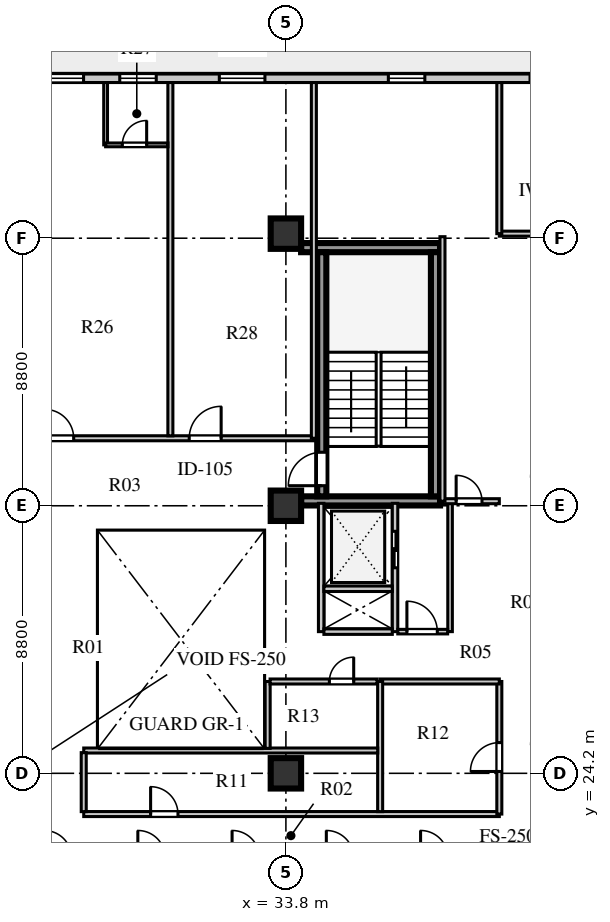
"""IFC4 building model, lengths in metres.
Left out: names, types, materials, properties, quantities, classifications, styles, units other than length and angle.
Written with IfcOpenShell. Run it as: python <this file> out.ifc"""

import sys

from ifc_helpers import new_model, si_unit, direction, frame, frame_2d, origin, origin_2d, place, context, subcontext, project, spatial, rectangle, extrude, element, fill, save


model = new_model("IFC4")
c1 = context("Model", 3, precision=1e-05, world=origin(), true_north=direction((0.0, 1.0)))
c2 = subcontext(c1, "Body", "Model", "MODEL_VIEW")
j1 = project(units=[si_unit("LENGTHUNIT", "METRE"), si_unit("PLANEANGLEUNIT", "RADIAN")], contexts=[c1])
p1 = place(None, origin())
s1 = spatial("IfcSite", under=j1, at=p1, CompositionType="ELEMENT")
p2 = place(p1, origin())
s2 = spatial("IfcBuilding", under=s1, at=p2, CompositionType="ELEMENT")
p3 = place(p2, frame((0.0, 0.0, 142.5)))
s3 = spatial("IfcBuildingStorey", under=s2, at=p3, CompositionType="ELEMENT", Elevation=142.5)
for number, where, z_axis, x_axis in (
    (1, (34.3, 33.16, 0.0), (0.0, 0.0, 1.0), (1.0, 0.0, 0.0)),
    (2, (34.3, 41.49, 0.0), (0.0, 0.0, 1.0), (1.0, 0.0, 0.0)),
):
    element("IfcWall", number, at=place(p3, frame(where, z_axis=z_axis, x_axis=x_axis)), inside=s3, PredefinedType="SHEAR", context=c2, shape_type="SweptSolid", body=[
        extrude(rectangle(XDim=4.57, YDim=0.3, at=frame_2d((2.285, 0.0))), origin(), (0.0, 0.0, 1.0), 3.6),
    ])
p4 = place(p3, frame((34.98, 33.31, 0.0), z_axis=(0.0, 0.0, 1.0), x_axis=(0.0, 1.0, 0.0)))
e3 = element("IfcWall", 3, at=p4, inside=s3, PredefinedType="SHEAR", context=c2, shape_type="SweptSolid", body=[
    extrude(rectangle(XDim=8.03, YDim=0.3, at=frame_2d((4.015, 0.0))), origin(), (0.0, 0.0, 1.0), 3.6),
])
p5 = place(p4, frame((0.35, 0.0, 0.0)))
e4 = element("IfcOpeningElement", 4, at=p5, cuts=e3, PredefinedType="OPENING", context=c2, shape_type="SweptSolid", body=[
    extrude(rectangle(XDim=1.1, YDim=2.1, at=frame_2d((0.55, 1.05))), frame((0.0, 0.16, 0.0), z_axis=(0.0, -1.0, 0.0), x_axis=(1.0, 0.0, 0.0)), (0.0, 0.0, 1.0), 0.32),
])
p6 = place(p3, frame((38.72, 33.31, 0.0), z_axis=(0.0, 0.0, 1.0), x_axis=(0.0, 1.0, 0.0)))
e5 = element("IfcWall", 5, at=p6, inside=s3, PredefinedType="SHEAR", context=c2, shape_type="SweptSolid", body=[
    extrude(rectangle(XDim=8.03, YDim=0.3, at=frame_2d((4.015, 0.0))), origin(), (0.0, 0.0, 1.0), 3.6),
])
for number, where, z_axis, x_axis in (
    (6, (33.8, 24.2, 0.0), (0.0, 0.0, 1.0), (1.0, 0.0, 0.0)),
    (7, (33.8, 33.0, 0.0), (0.0, 0.0, 1.0), (1.0, 0.0, 0.0)),
    (8, (33.8, 41.95, 0.0), (0.0, 0.0, 1.0), (1.0, 0.0, 0.0)),
):
    element("IfcColumn", number, at=place(p3, frame(where, z_axis=z_axis, x_axis=x_axis)), inside=s3, PredefinedType="COLUMN", context=c2, shape_type="SweptSolid", body=[
        extrude(rectangle(XDim=1.0, YDim=1.0, at=origin_2d()), origin(), (0.0, 0.0, 1.0), 3.6),
    ])
p7 = place(p3, frame((45.35, 47.06, 0.0), z_axis=(0.0, 0.0, 1.0), x_axis=(-1.0, 0.0, 0.0)))
e9 = element("IfcWall", 9, at=p7, inside=s3, PredefinedType="STANDARD", context=c2, shape_type="SweptSolid", body=[
    extrude(rectangle(XDim=32.1, YDim=0.28, at=frame_2d((16.05, 0.0))), origin(), (0.0, 0.0, 1.0), 3.6),
])
p8 = place(p7, frame((30.15, 0.0, 0.0)))
e10 = element("IfcOpeningElement", 10, at=p8, cuts=e9, PredefinedType="OPENING", context=c2, shape_type="SweptSolid", body=[
    extrude(rectangle(XDim=1.0, YDim=2.05, at=frame_2d((0.5, 1.025))), frame((0.0, 0.15, 0.0), z_axis=(0.0, -1.0, 0.0), x_axis=(1.0, 0.0, 0.0)), (0.0, 0.0, 1.0), 0.3),
])
p9 = place(p7, frame((24.195, 0.0, 0.8)))
e11 = element("IfcOpeningElement", 11, at=p9, cuts=e9, PredefinedType="OPENING", context=c2, shape_type="SweptSolid", body=[
    extrude(rectangle(XDim=1.95, YDim=2.0, at=frame_2d((0.975, 1.0))), frame((0.0, 0.15, 0.0), z_axis=(0.0, -1.0, 0.0), x_axis=(1.0, 0.0, 0.0)), (0.0, 0.0, 1.0), 0.3),
])
p10 = place(p7, frame((18.205, 0.0, 0.8)))
e12 = element("IfcOpeningElement", 12, at=p10, cuts=e9, PredefinedType="OPENING", context=c2, shape_type="SweptSolid", body=[
    extrude(rectangle(XDim=1.2, YDim=1.75, at=frame_2d((0.6, 0.875))), frame((0.0, 0.15, 0.0), z_axis=(0.0, -1.0, 0.0), x_axis=(1.0, 0.0, 0.0)), (0.0, 0.0, 1.0), 0.3),
])
p11 = place(p7, frame((15.815, 0.0, 0.8)))
e13 = element("IfcOpeningElement", 13, at=p11, cuts=e9, PredefinedType="OPENING", context=c2, shape_type="SweptSolid", body=[
    extrude(rectangle(XDim=1.2, YDim=1.75, at=frame_2d((0.6, 0.875))), frame((0.0, 0.15, 0.0), z_axis=(0.0, -1.0, 0.0), x_axis=(1.0, 0.0, 0.0)), (0.0, 0.0, 1.0), 0.3),
])
p12 = place(p7, frame((12.24, 0.0, 0.8)))
e14 = element("IfcOpeningElement", 14, at=p12, cuts=e9, PredefinedType="OPENING", context=c2, shape_type="SweptSolid", body=[
    extrude(rectangle(XDim=1.5, YDim=2.0, at=frame_2d((0.75, 1.0))), frame((0.0, 0.15, 0.0), z_axis=(0.0, -1.0, 0.0), x_axis=(1.0, 0.0, 0.0)), (0.0, 0.0, 1.0), 0.3),
])
p13 = place(p7, frame((6.98, 0.0, 0.8)))
e15 = element("IfcOpeningElement", 15, at=p13, cuts=e9, PredefinedType="OPENING", context=c2, shape_type="SweptSolid", body=[
    extrude(rectangle(XDim=1.2, YDim=1.75, at=frame_2d((0.6, 0.875))), frame((0.0, 0.15, 0.0), z_axis=(0.0, -1.0, 0.0), x_axis=(1.0, 0.0, 0.0)), (0.0, 0.0, 1.0), 0.3),
])
p14 = place(p7, frame((1.12, 0.0, 0.8)))
e16 = element("IfcOpeningElement", 16, at=p14, cuts=e9, PredefinedType="OPENING", context=c2, shape_type="SweptSolid", body=[
    extrude(rectangle(XDim=2.4, YDim=2.05, at=frame_2d((1.2, 1.025))), frame((0.0, 0.15, 0.0), z_axis=(0.0, -1.0, 0.0), x_axis=(1.0, 0.0, 0.0)), (0.0, 0.0, 1.0), 0.3),
])
p15 = place(p3, frame((34.96, 28.86, 0.0), z_axis=(0.0, 0.0, 1.0), x_axis=(0.0, 1.0, 0.0)))
e17 = element("IfcWall", 17, at=p15, inside=s3, PredefinedType="SOLIDWALL", context=c2, shape_type="SweptSolid", body=[
    extrude(rectangle(XDim=4.22, YDim=0.18, at=frame_2d((2.11, 0.0))), origin(), (0.0, 0.0, 1.0), 3.6),
])
p16 = place(p3, frame((37.39, 28.86, 0.0), z_axis=(0.0, 0.0, 1.0), x_axis=(0.0, 1.0, 0.0)))
e18 = element("IfcWall", 18, at=p16, inside=s3, PredefinedType="SOLIDWALL", context=c2, shape_type="SweptSolid", body=[
    extrude(rectangle(XDim=4.22, YDim=0.18, at=frame_2d((2.11, 0.0))), origin(), (0.0, 0.0, 1.0), 3.6),
])
p17 = place(p16, frame((2.1, 0.0, 0.0)))
e19 = element("IfcOpeningElement", 19, at=p17, cuts=e18, PredefinedType="OPENING", context=c2, shape_type="SweptSolid", body=[
    extrude(rectangle(XDim=1.2, YDim=2.12, at=frame_2d((0.6, 1.06))), frame((0.0, 0.1, 0.0), z_axis=(0.0, -1.0, 0.0), x_axis=(1.0, 0.0, 0.0)), (0.0, 0.0, 1.0), 0.2),
])
for number, where, z_axis, x_axis in (
    (20, (35.05, 28.86, 0.0), (0.0, 0.0, 1.0), (1.0, 0.0, 0.0)),
    (21, (35.05, 30.27, 0.0), (0.0, 0.0, 1.0), (1.0, 0.0, 0.0)),
):
    element("IfcWall", number, at=place(p3, frame(where, z_axis=z_axis, x_axis=x_axis)), inside=s3, PredefinedType="SOLIDWALL", context=c2, shape_type="SweptSolid", body=[
        extrude(rectangle(XDim=2.25, YDim=0.18, at=frame_2d((1.125, 0.0))), origin(), (0.0, 0.0, 1.0), 3.6),
    ])
p18 = place(p3, frame((39.2, 28.86, 0.0), z_axis=(0.0, 0.0, 1.0), x_axis=(0.0, 1.0, 0.0)))
e22 = element("IfcWall", 22, at=p18, inside=s3, PredefinedType="PARTITIONING", context=c2, shape_type="SweptSolid", body=[
    extrude(rectangle(XDim=4.22, YDim=0.15, at=frame_2d((2.11, 0.0))), origin(), (0.0, 0.0, 1.0), 3.6),
])
p19 = place(p3, frame((37.48, 28.86, 0.0), z_axis=(0.0, 0.0, 1.0), x_axis=(1.0, 0.0, 0.0)))
e23 = element("IfcWall", 23, at=p19, inside=s3, PredefinedType="PARTITIONING", context=c2, shape_type="SweptSolid", body=[
    extrude(rectangle(XDim=1.64, YDim=0.15, at=frame_2d((0.82, 0.0))), origin(), (0.0, 0.0, 1.0), 3.6),
])
p20 = place(p19, frame((0.3, 0.0, 0.0)))
e24 = element("IfcOpeningElement", 24, at=p20, cuts=e23, PredefinedType="OPENING", context=c2, shape_type="SweptSolid", body=[
    extrude(rectangle(XDim=1.0, YDim=2.1, at=frame_2d((0.5, 1.05))), frame((0.0, 0.085, 0.0), z_axis=(0.0, -1.0, 0.0), x_axis=(1.0, 0.0, 0.0)), (0.0, 0.0, 1.0), 0.17),
])
p21 = place(p3, frame((27.15, 22.86, 0.0), z_axis=(0.0, 0.0, 1.0), x_axis=(1.0, 0.0, 0.0)))
e25 = element("IfcWall", 25, at=p21, inside=s3, PredefinedType="PARTITIONING", context=c2, shape_type="SweptSolid", body=[
    extrude(rectangle(XDim=13.67, YDim=0.165, at=frame_2d((6.835, 0.0))), origin(), (0.0, 0.0, 1.0), 3.6),
])
p22 = place(p21, frame((2.2, 0.0, 0.0)))
e26 = element("IfcOpeningElement", 26, at=p22, cuts=e25, PredefinedType="OPENING", context=c2, shape_type="SweptSolid", body=[
    extrude(rectangle(XDim=0.9, YDim=2.08, at=frame_2d((0.45, 1.04))), frame((0.0, 0.093, 0.0), z_axis=(0.0, -1.0, 0.0), x_axis=(1.0, 0.0, 0.0)), (0.0, 0.0, 1.0), 0.185),
])
p23 = place(p3, frame((25.22, 35.22, 0.0), z_axis=(0.0, 0.0, 1.0), x_axis=(1.0, 0.0, 0.0)))
e27 = element("IfcWall", 27, at=p23, inside=s3, PredefinedType="PARTITIONING", context=c2, shape_type="SweptSolid", body=[
    extrude(rectangle(XDim=9.5, YDim=0.165, at=frame_2d((4.75, 0.0))), origin(), (0.0, 0.0, 1.0), 3.6),
])
p24 = place(p23, frame((0.65, 0.0, 0.0)))
e28 = element("IfcOpeningElement", 28, at=p24, cuts=e27, PredefinedType="OPENING", context=c2, shape_type="SweptSolid", body=[
    extrude(rectangle(XDim=0.95, YDim=2.1, at=frame_2d((0.475, 1.05))), frame((0.0, 0.093, 0.0), z_axis=(0.0, -1.0, 0.0), x_axis=(1.0, 0.0, 0.0)), (0.0, 0.0, 1.0), 0.185),
])
p25 = place(p23, frame((5.4, 0.0, 0.0)))
e29 = element("IfcOpeningElement", 29, at=p25, cuts=e27, PredefinedType="OPENING", context=c2, shape_type="SweptSolid", body=[
    extrude(rectangle(XDim=1.05, YDim=2.1, at=frame_2d((0.525, 1.05))), frame((0.0, 0.093, 0.0), z_axis=(0.0, -1.0, 0.0), x_axis=(1.0, 0.0, 0.0)), (0.0, 0.0, 1.0), 0.185),
])
p26 = place(p3, frame((40.82, 41.95, 0.0), z_axis=(0.0, 0.0, 1.0), x_axis=(1.0, 0.0, 0.0)))
e30 = element("IfcWall", 30, at=p26, inside=s3, PredefinedType="PARTITIONING", context=c2, shape_type="SweptSolid", body=[
    extrude(rectangle(XDim=7.3, YDim=0.165, at=frame_2d((3.65, 0.0))), origin(), (0.0, 0.0, 1.0), 2.95),
])
p27 = place(p3, frame((40.82, 22.86, 0.0), z_axis=(0.0, 0.0, 1.0), x_axis=(0.0, 1.0, 0.0)))
e31 = element("IfcWall", 31, at=p27, inside=s3, PredefinedType="PARTITIONING", context=c2, shape_type="SweptSolid", body=[
    extrude(rectangle(XDim=4.36, YDim=0.165, at=frame_2d((2.18, 0.0))), origin(), (0.0, 0.0, 1.0), 3.6),
])
p28 = place(p27, frame((1.4, 0.0, 0.0)))
e32 = element("IfcOpeningElement", 32, at=p28, cuts=e31, PredefinedType="OPENING", context=c2, shape_type="SweptSolid", body=[
    extrude(rectangle(XDim=0.95, YDim=2.1, at=frame_2d((0.475, 1.05))), frame((0.0, 0.093, 0.0), z_axis=(0.0, -1.0, 0.0), x_axis=(1.0, 0.0, 0.0)), (0.0, 0.0, 1.0), 0.185),
])
p29 = place(p3, frame((36.9, 27.22, 0.0), z_axis=(0.0, 0.0, 1.0), x_axis=(1.0, 0.0, 0.0)))
e33 = element("IfcWall", 33, at=p29, inside=s3, PredefinedType="PARTITIONING", context=c2, shape_type="SweptSolid", body=[
    extrude(rectangle(XDim=3.92, YDim=0.165, at=frame_2d((1.96, 0.0))), origin(), (0.0, 0.0, 1.0), 3.2),
])
p30 = place(p3, frame((36.9, 22.94, 0.0), z_axis=(0.0, 0.0, 1.0), x_axis=(0.0, 1.0, 0.0)))
e34 = element("IfcWall", 34, at=p30, inside=s3, PredefinedType="PARTITIONING", context=c2, shape_type="SweptSolid", body=[
    extrude(rectangle(XDim=4.28, YDim=0.165, at=frame_2d((2.14, 0.0))), origin(), (0.0, 0.0, 1.0), 3.6),
])
p31 = place(p3, frame((27.15, 24.95, 0.0), z_axis=(0.0, 0.0, 1.0), x_axis=(1.0, 0.0, 0.0)))
e35 = element("IfcWall", 35, at=p31, inside=s3, PredefinedType="PARTITIONING", context=c2, shape_type="SweptSolid", body=[
    extrude(rectangle(XDim=9.67, YDim=0.165, at=frame_2d((4.835, 0.0))), origin(), (0.0, 0.0, 1.0), 3.05),
])
p32 = place(p3, frame((27.15, 22.94, 0.0), z_axis=(0.0, 0.0, 1.0), x_axis=(0.0, 1.0, 0.0)))
e36 = element("IfcWall", 36, at=p32, inside=s3, PredefinedType="PARTITIONING", context=c2, shape_type="SweptSolid", body=[
    extrude(rectangle(XDim=1.94, YDim=0.165, at=frame_2d((0.97, 0.0))), origin(), (0.0, 0.0, 1.0), 3.6),
])
p33 = place(p3, frame((33.2, 25.02, 0.0), z_axis=(0.0, 0.0, 1.0), x_axis=(0.0, 1.0, 0.0)))
e37 = element("IfcWall", 37, at=p33, inside=s3, PredefinedType="PARTITIONING", context=c2, shape_type="SweptSolid", body=[
    extrude(rectangle(XDim=2.2, YDim=0.165, at=frame_2d((1.1, 0.0))), origin(), (0.0, 0.0, 1.0), 3.05),
])
p34 = place(p3, frame((33.28, 27.22, 0.0), z_axis=(0.0, 0.0, 1.0), x_axis=(1.0, 0.0, 0.0)))
e38 = element("IfcWall", 38, at=p34, inside=s3, PredefinedType="PARTITIONING", context=c2, shape_type="SweptSolid", body=[
    extrude(rectangle(XDim=3.52, YDim=0.165, at=frame_2d((1.76, 0.0))), origin(), (0.0, 0.0, 1.0), 3.2),
])
p35 = place(p34, frame((1.95, 0.0, 0.0)))
e39 = element("IfcOpeningElement", 39, at=p35, cuts=e38, PredefinedType="OPENING", context=c2, shape_type="SweptSolid", body=[
    extrude(rectangle(XDim=0.8, YDim=2.05, at=frame_2d((0.4, 1.025))), frame((0.0, 0.093, 0.0), z_axis=(0.0, -1.0, 0.0), x_axis=(1.0, 0.0, 0.0)), (0.0, 0.0, 1.0), 0.185),
])
p36 = place(p3, frame((34.72, 35.22, 0.0), z_axis=(0.0, 0.0, 1.0), x_axis=(0.0, 1.0, 0.0)))
e40 = element("IfcWall", 40, at=p36, inside=s3, PredefinedType="PARTITIONING", context=c2, shape_type="SweptSolid", body=[
    extrude(rectangle(XDim=11.7, YDim=0.165, at=frame_2d((5.85, 0.0))), origin(), (0.0, 0.0, 1.0), 3.6),
])
p37 = place(p3, frame((30.0, 35.3, 0.0), z_axis=(0.0, 0.0, 1.0), x_axis=(0.0, 1.0, 0.0)))
e41 = element("IfcWall", 41, at=p37, inside=s3, PredefinedType="PARTITIONING", context=c2, shape_type="SweptSolid", body=[
    extrude(rectangle(XDim=11.62, YDim=0.165, at=frame_2d((5.81, 0.0))), origin(), (0.0, 0.0, 1.0), 3.6),
])
p38 = place(p3, frame((27.87, 44.87, 0.0), z_axis=(0.0, 0.0, 1.0), x_axis=(0.0, 1.0, 0.0)))
e42 = element("IfcWall", 42, at=p38, inside=s3, PredefinedType="PLUMBINGWALL", context=c2, shape_type="SweptSolid", body=[
    extrude(rectangle(XDim=2.05, YDim=0.125, at=frame_2d((1.025, 0.0))), origin(), (0.0, 0.0, 1.0), 3.6),
])
p39 = place(p3, frame((27.87, 44.87, 0.0), z_axis=(0.0, 0.0, 1.0), x_axis=(1.0, 0.0, 0.0)))
e43 = element("IfcWall", 43, at=p39, inside=s3, PredefinedType="PLUMBINGWALL", context=c2, shape_type="SweptSolid", body=[
    extrude(rectangle(XDim=2.05, YDim=0.125, at=frame_2d((1.025, 0.0))), origin(), (0.0, 0.0, 1.0), 3.6),
])
p40 = place(p39, frame((0.55, 0.0, 0.0)))
e44 = element("IfcOpeningElement", 44, at=p40, cuts=e43, PredefinedType="OPENING", context=c2, shape_type="SweptSolid", body=[
    extrude(rectangle(XDim=0.8, YDim=2.05, at=frame_2d((0.4, 1.025))), frame((0.0, 0.073, 0.0), z_axis=(0.0, -1.0, 0.0), x_axis=(1.0, 0.0, 0.0)), (0.0, 0.0, 1.0), 0.145),
])
p41 = place(p3, frame((38.95, 33.15, 0.0), z_axis=(0.0, 0.0, 1.0), x_axis=(1.0, 0.0, 0.0)))
e45 = element("IfcWall", 45, at=p41, inside=s3, PredefinedType="PARTITIONING", context=c2, shape_type="SweptSolid", body=[
    extrude(rectangle(XDim=1.87, YDim=0.165, at=frame_2d((0.935, 0.0))), origin(), (0.0, 0.0, 1.0), 3.6),
])
p42 = place(p41, frame((0.45, 0.0, 0.0)))
e46 = element("IfcOpeningElement", 46, at=p42, cuts=e45, PredefinedType="OPENING", context=c2, shape_type="SweptSolid", body=[
    extrude(rectangle(XDim=0.85, YDim=2.05, at=frame_2d((0.425, 1.025))), frame((0.0, 0.093, 0.0), z_axis=(0.0, -1.0, 0.0), x_axis=(1.0, 0.0, 0.0)), (0.0, 0.0, 1.0), 0.185),
])
p43 = place(p3, frame((38.95, 33.15, 0.0), z_axis=(0.0, 0.0, 1.0), x_axis=(0.0, 1.0, 0.0)))
e47 = element("IfcWall", 47, at=p43, inside=s3, PredefinedType="PARTITIONING", context=c2, shape_type="SweptSolid", body=[
    extrude(rectangle(XDim=8.7, YDim=0.165, at=frame_2d((4.35, 0.0))), origin(), (0.0, 0.0, 1.0), 3.6),
])
p44 = place(p3, frame((40.82, 41.95, 0.0), z_axis=(0.0, 0.0, 1.0), x_axis=(0.0, 1.0, 0.0)))
e48 = element("IfcWall", 48, at=p44, inside=s3, PredefinedType="PARTITIONING", context=c2, shape_type="SweptSolid", body=[
    extrude(rectangle(XDim=4.97, YDim=0.165, at=frame_2d((2.485, 0.0))), origin(), (0.0, 0.0, 1.0), 3.6),
])
p45 = place(p10, origin())
e49 = element("IfcWindow", 49, at=p45, inside=s3, PartitioningType="SINGLE_PANEL", PredefinedType="WINDOW", context=c2, shape_type="SweptSolid", body=[
    extrude(rectangle(XDim=1.2, YDim=1.75, at=frame_2d((0.6, 0.875))), frame((0.0, 0.03, 0.0), z_axis=(0.0, -1.0, 0.0), x_axis=(1.0, 0.0, 0.0)), (0.0, 0.0, 1.0), 0.06),
])
fill(e12, e49)
p46 = place(p11, origin())
e50 = element("IfcWindow", 50, at=p46, inside=s3, PartitioningType="SINGLE_PANEL", PredefinedType="WINDOW", context=c2, shape_type="SweptSolid", body=[
    extrude(rectangle(XDim=1.2, YDim=1.75, at=frame_2d((0.6, 0.875))), frame((0.0, 0.03, 0.0), z_axis=(0.0, -1.0, 0.0), x_axis=(1.0, 0.0, 0.0)), (0.0, 0.0, 1.0), 0.06),
])
fill(e13, e50)
p47 = place(p12, origin())
e51 = element("IfcWindow", 51, at=p47, inside=s3, PartitioningType="SINGLE_PANEL", PredefinedType="WINDOW", context=c2, shape_type="SweptSolid", body=[
    extrude(rectangle(XDim=1.5, YDim=2.0, at=frame_2d((0.75, 1.0))), frame((0.0, 0.03, 0.0), z_axis=(0.0, -1.0, 0.0), x_axis=(1.0, 0.0, 0.0)), (0.0, 0.0, 1.0), 0.06),
])
fill(e14, e51)
p48 = place(p13, origin())
e52 = element("IfcWindow", 52, at=p48, inside=s3, PartitioningType="SINGLE_PANEL", PredefinedType="WINDOW", context=c2, shape_type="SweptSolid", body=[
    extrude(rectangle(XDim=1.2, YDim=1.75, at=frame_2d((0.6, 0.875))), frame((0.0, 0.03, 0.0), z_axis=(0.0, -1.0, 0.0), x_axis=(1.0, 0.0, 0.0)), (0.0, 0.0, 1.0), 0.06),
])
fill(e15, e52)
p49 = place(p5, origin())
e53 = element("IfcDoor", 53, at=p49, inside=s3, OperationType="SINGLE_SWING_LEFT", PredefinedType="DOOR", context=c2, shape_type="SweptSolid", body=[
    extrude(rectangle(XDim=1.1, YDim=2.1, at=frame_2d((0.55, 1.05))), frame((0.0, 0.025, 0.0), z_axis=(0.0, -1.0, 0.0), x_axis=(1.0, 0.0, 0.0)), (0.0, 0.0, 1.0), 0.05),
])
fill(e4, e53)
p50 = place(p17, frame((1.2, 0.0, 0.0), z_axis=(0.0, 0.0, 1.0), x_axis=(-1.0, 0.0, 0.0)))
e54 = element("IfcDoor", 54, at=p50, inside=s3, OperationType="DOUBLE_DOOR_SLIDING", PredefinedType="DOOR", context=c2, shape_type="SweptSolid", body=[
    extrude(rectangle(XDim=1.2, YDim=2.12, at=frame_2d((0.6, 1.06))), frame((0.0, 0.025, 0.0), z_axis=(0.0, -1.0, 0.0), x_axis=(1.0, 0.0, 0.0)), (0.0, 0.0, 1.0), 0.05),
])
fill(e19, e54)
p51 = place(p20, origin())
e55 = element("IfcDoor", 55, at=p51, inside=s3, OperationType="SINGLE_SWING_LEFT", PredefinedType="DOOR", context=c2, shape_type="SweptSolid", body=[
    extrude(rectangle(XDim=1.0, YDim=2.1, at=frame_2d((0.5, 1.05))), frame((0.0, 0.025, 0.0), z_axis=(0.0, -1.0, 0.0), x_axis=(1.0, 0.0, 0.0)), (0.0, 0.0, 1.0), 0.05),
])
fill(e24, e55)
p52 = place(p35, frame((0.8, 0.0, 0.0), z_axis=(0.0, 0.0, 1.0), x_axis=(-1.0, 0.0, 0.0)))
e56 = element("IfcDoor", 56, at=p52, inside=s3, OperationType="SINGLE_SWING_LEFT", PredefinedType="DOOR", context=c2, shape_type="SweptSolid", body=[
    extrude(rectangle(XDim=0.8, YDim=2.05, at=frame_2d((0.4, 1.025))), frame((0.0, 0.025, 0.0), z_axis=(0.0, -1.0, 0.0), x_axis=(1.0, 0.0, 0.0)), (0.0, 0.0, 1.0), 0.05),
])
fill(e39, e56)
p53 = place(p22, origin())
e57 = element("IfcDoor", 57, at=p53, inside=s3, OperationType="SINGLE_SWING_LEFT", PredefinedType="DOOR", context=c2, shape_type="SweptSolid", body=[
    extrude(rectangle(XDim=0.9, YDim=2.08, at=frame_2d((0.45, 1.04))), frame((0.0, 0.025, 0.0), z_axis=(0.0, -1.0, 0.0), x_axis=(1.0, 0.0, 0.0)), (0.0, 0.0, 1.0), 0.05),
])
fill(e26, e57)
p54 = place(p28, frame((0.95, 0.0, 0.0), z_axis=(0.0, 0.0, 1.0), x_axis=(-1.0, 0.0, 0.0)))
e58 = element("IfcDoor", 58, at=p54, inside=s3, OperationType="SINGLE_SWING_RIGHT", PredefinedType="DOOR", context=c2, shape_type="SweptSolid", body=[
    extrude(rectangle(XDim=0.95, YDim=2.1, at=frame_2d((0.475, 1.05))), frame((0.0, 0.025, 0.0), z_axis=(0.0, -1.0, 0.0), x_axis=(1.0, 0.0, 0.0)), (0.0, 0.0, 1.0), 0.05),
])
fill(e32, e58)
p55 = place(p24, origin())
e59 = element("IfcDoor", 59, at=p55, inside=s3, OperationType="SINGLE_SWING_LEFT", PredefinedType="DOOR", context=c2, shape_type="SweptSolid", body=[
    extrude(rectangle(XDim=0.95, YDim=2.1, at=frame_2d((0.475, 1.05))), frame((0.0, 0.025, 0.0), z_axis=(0.0, -1.0, 0.0), x_axis=(1.0, 0.0, 0.0)), (0.0, 0.0, 1.0), 0.05),
])
fill(e28, e59)
p56 = place(p40, frame((0.8, 0.0, 0.0), z_axis=(0.0, 0.0, 1.0), x_axis=(-1.0, 0.0, 0.0)))
e60 = element("IfcDoor", 60, at=p56, inside=s3, OperationType="SINGLE_SWING_LEFT", PredefinedType="DOOR", context=c2, shape_type="SweptSolid", body=[
    extrude(rectangle(XDim=0.8, YDim=2.05, at=frame_2d((0.4, 1.025))), frame((0.0, 0.025, 0.0), z_axis=(0.0, -1.0, 0.0), x_axis=(1.0, 0.0, 0.0)), (0.0, 0.0, 1.0), 0.05),
])
fill(e44, e60)
p57 = place(p25, origin())
e61 = element("IfcDoor", 61, at=p57, inside=s3, OperationType="SINGLE_SWING_RIGHT", PredefinedType="DOOR", context=c2, shape_type="SweptSolid", body=[
    extrude(rectangle(XDim=1.05, YDim=2.1, at=frame_2d((0.525, 1.05))), frame((0.0, 0.025, 0.0), z_axis=(0.0, -1.0, 0.0), x_axis=(1.0, 0.0, 0.0)), (0.0, 0.0, 1.0), 0.05),
])
fill(e29, e61)
p58 = place(p42, origin())
e62 = element("IfcDoor", 62, at=p58, inside=s3, OperationType="SINGLE_SWING_LEFT", PredefinedType="DOOR", context=c2, shape_type="SweptSolid", body=[
    extrude(rectangle(XDim=0.85, YDim=2.05, at=frame_2d((0.425, 1.025))), frame((0.0, 0.025, 0.0), z_axis=(0.0, -1.0, 0.0), x_axis=(1.0, 0.0, 0.0)), (0.0, 0.0, 1.0), 0.05),
])
fill(e46, e62)
save(model, sys.argv[1])
